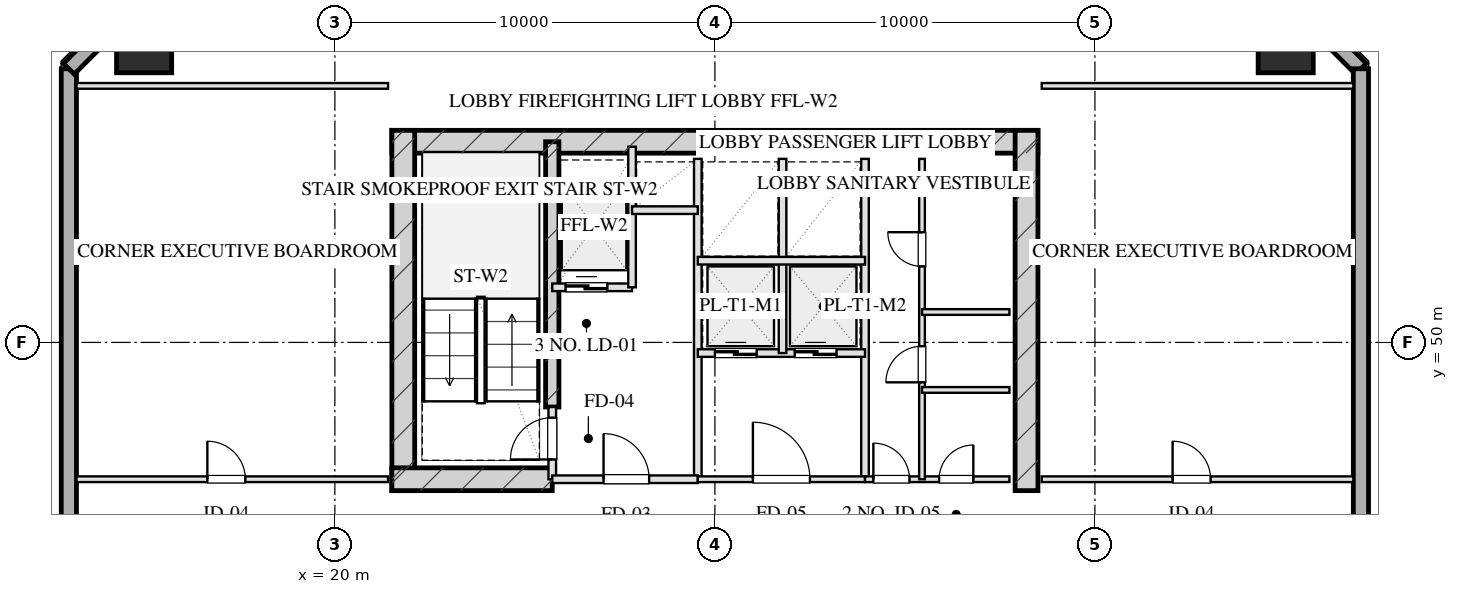
"""IFC4 building model, lengths in metres.
Left out: names, types, materials, properties, quantities, classifications, styles, units other than length and angle.
Written with IfcOpenShell. Run it as: python <this file> out.ifc"""

import sys

from ifc_helpers import new_model, si_unit, direction, frame, frame_2d, origin, origin_2d, place, context, subcontext, project, spatial, rectangle, hollow_rectangle, extrude, element, fill, save


model = new_model("IFC4")
c1 = context("Model", 3, precision=1e-05, world=origin(), true_north=direction((0.0, 1.0)))
c2 = subcontext(c1, "Body", "Model", "MODEL_VIEW")
j1 = project(units=[si_unit("LENGTHUNIT", "METRE"), si_unit("PLANEANGLEUNIT", "RADIAN")], contexts=[c1])
p1 = place(None, origin())
s1 = spatial("IfcSite", under=j1, at=p1, CompositionType="ELEMENT")
p2 = place(p1, origin())
s2 = spatial("IfcBuilding", under=s1, at=p2, CompositionType="ELEMENT")
p3 = place(p2, frame((0.0, 0.0, 166.75)))
s3 = spatial("IfcBuildingStorey", under=s2, at=p3, CompositionType="ELEMENT", Elevation=166.75)
p4 = place(p3, frame((21.5, 55.28, 0.0), z_axis=(0.0, 0.0, 1.0), x_axis=(1.0, 0.0, 0.0)))
e1 = element("IfcWall", 1, at=p4, inside=s3, PredefinedType="SHEAR", context=c2, shape_type="SweptSolid", body=[
    extrude(rectangle(XDim=17.0, YDim=0.6, at=frame_2d((8.5, 0.0))), origin(), (0.0, 0.0, 1.0), 3.45),
])
for number, where, z_axis, x_axis in (
    (2, (21.8, 46.1, 0.0), (0.0, 0.0, 1.0), (0.0, 1.0, 0.0)),
    (3, (38.2, 46.1, 0.0), (0.0, 0.0, 1.0), (0.0, 1.0, 0.0)),
):
    element("IfcWall", number, at=place(p3, frame(where, z_axis=z_axis, x_axis=x_axis)), inside=s3, PredefinedType="SHEAR", context=c2, shape_type="SweptSolid", body=[
        extrude(rectangle(XDim=9.48, YDim=0.6, at=frame_2d((4.74, 0.0))), origin(), (0.0, 0.0, 1.0), 3.45),
    ])
p5 = place(p3, frame((25.72, 48.3, 0.0), z_axis=(0.0, 0.0, 1.0), x_axis=(0.0, 1.0, 0.0)))
e4 = element("IfcWall", 4, at=p5, inside=s3, PredefinedType="SHEAR", context=c2, shape_type="SweptSolid", body=[
    extrude(rectangle(XDim=6.98, YDim=0.35, at=frame_2d((3.49, 0.0))), origin(), (0.0, 0.0, 1.0), 3.45),
])
p6 = place(p3, frame((21.5, 46.4, 0.0), z_axis=(0.0, 0.0, 1.0), x_axis=(1.0, 0.0, 0.0)))
e5 = element("IfcWall", 5, at=p6, inside=s3, PredefinedType="SHEAR", context=c2, shape_type="SweptSolid", body=[
    extrude(rectangle(XDim=4.22, YDim=0.6, at=frame_2d((2.11, 0.0))), origin(), (0.0, 0.0, 1.0), 3.45),
])
for number, where, z_axis, x_axis in (
    (6, (45.02, 57.82, 0.0), (0.0, 0.0, 1.0), (1.0, 0.0, 0.0)),
    (7, (14.98, 57.82, 0.0), (0.0, 0.0, 1.0), (1.0, 0.0, 0.0)),
):
    element("IfcColumn", number, at=place(p3, frame(where, z_axis=z_axis, x_axis=x_axis)), inside=s3, PredefinedType="COLUMN", context=c2, shape_type="SweptSolid", body=[
        extrude(hollow_rectangle(XDim=1.45, YDim=1.45, WallThickness=0.05, at=origin_2d()), origin(), (0.0, 0.0, 1.0), 3.451),
    ])
p7 = place(p3, frame((13.0, 10.8, 0.0), z_axis=(0.0, 0.0, 1.0), x_axis=(0.0, 1.0, 0.0)))
e8 = element("IfcWall", 8, at=p7, inside=s3, PredefinedType="SOLIDWALL", context=c2, shape_type="SweptSolid", body=[
    extrude(rectangle(XDim=46.4, YDim=0.4, at=frame_2d((23.2, 0.0))), origin(), (0.0, 0.0, 1.0), 2.61),
])
p8 = place(p7, frame((16.85, 0.0, 0.0)))
e9 = element("IfcOpeningElement", 9, at=p8, cuts=e8, PredefinedType="OPENING", context=c2, shape_type="SweptSolid", body=[
    extrude(rectangle(XDim=1.1, YDim=2.15, at=frame_2d((0.55, 1.075))), frame((0.0, 0.21, 0.0), z_axis=(0.0, -1.0, 0.0), x_axis=(1.0, 0.0, 0.0)), (0.0, 0.0, 1.0), 0.42),
])
for number, where, z_axis, x_axis in (
    (10, (13.0, 57.2, 0.0), (0.0, 0.0, 1.0), (0.707, 0.707, 0.0)),
    (11, (44.4, 59.8, 0.0), (0.0, 0.0, 1.0), (0.707, -0.707, 0.0)),
):
    element("IfcWall", number, at=place(p3, frame(where, z_axis=z_axis, x_axis=x_axis)), inside=s3, PredefinedType="SOLIDWALL", context=c2, shape_type="SweptSolid", body=[
        extrude(rectangle(XDim=3.677, YDim=0.4, at=frame_2d((1.838, 0.0))), origin(), (0.0, 0.0, 1.0), 2.61),
    ])
p9 = place(p3, frame((47.0, 57.2, 0.0), z_axis=(0.0, 0.0, 1.0), x_axis=(0.0, -1.0, 0.0)))
e12 = element("IfcWall", 12, at=p9, inside=s3, PredefinedType="SOLIDWALL", context=c2, shape_type="SweptSolid", body=[
    extrude(rectangle(XDim=46.4, YDim=0.4, at=frame_2d((23.2, 0.0))), origin(), (0.0, 0.0, 1.0), 2.61),
])
p10 = place(p9, frame((25.596, 0.0, 0.0)))
e13 = element("IfcOpeningElement", 13, at=p10, cuts=e12, PredefinedType="OPENING", context=c2, shape_type="SweptSolid", body=[
    extrude(rectangle(XDim=1.1, YDim=2.15, at=frame_2d((0.55, 1.075))), frame((0.0, 0.21, 0.0), z_axis=(0.0, -1.0, 0.0), x_axis=(1.0, 0.0, 0.0)), (0.0, 0.0, 1.0), 0.42),
])
p11 = place(p3, frame((25.72, 46.4, 0.0), z_axis=(0.0, 0.0, 1.0), x_axis=(0.0, 1.0, 0.0)))
e14 = element("IfcWall", 14, at=p11, inside=s3, PredefinedType="PARTITIONING", context=c2, shape_type="SweptSolid", body=[
    extrude(rectangle(XDim=1.9, YDim=0.2, at=frame_2d((0.95, 0.0))), origin(), (0.0, 0.0, 1.0), 3.175),
])
p12 = place(p11, frame((0.52, 0.0, 0.0)))
e15 = element("IfcOpeningElement", 15, at=p12, cuts=e14, PredefinedType="OPENING", context=c2, shape_type="SweptSolid", body=[
    extrude(rectangle(XDim=1.1, YDim=2.05, at=frame_2d((0.55, 1.025))), frame((0.0, 0.11, 0.0), z_axis=(0.0, -1.0, 0.0), x_axis=(1.0, 0.0, 0.0)), (0.0, 0.0, 1.0), 0.22),
])
p13 = place(p3, frame((29.55, 46.4, 0.0), z_axis=(0.0, 0.0, 1.0), x_axis=(0.0, 1.0, 0.0)))
e16 = element("IfcWall", 16, at=p13, inside=s3, PredefinedType="PARTITIONING", context=c2, shape_type="SweptSolid", body=[
    extrude(rectangle(XDim=8.43, YDim=0.2, at=frame_2d((4.215, 0.0))), origin(), (0.0, 0.0, 1.0), 3.175),
])
p14 = place(p3, frame((25.72, 46.4, 0.0), z_axis=(0.0, 0.0, 1.0), x_axis=(1.0, 0.0, 0.0)))
e17 = element("IfcWall", 17, at=p14, inside=s3, PredefinedType="PARTITIONING", context=c2, shape_type="SweptSolid", body=[
    extrude(rectangle(XDim=3.83, YDim=0.2, at=frame_2d((1.915, 0.0))), origin(), (0.0, 0.0, 1.0), 3.175),
])
p15 = place(p14, frame((1.35, 0.0, 0.0)))
e18 = element("IfcOpeningElement", 18, at=p15, cuts=e17, PredefinedType="OPENING", context=c2, shape_type="SweptSolid", body=[
    extrude(rectangle(XDim=1.2, YDim=2.05, at=frame_2d((0.6, 1.025))), frame((0.0, 0.11, 0.0), z_axis=(0.0, -1.0, 0.0), x_axis=(1.0, 0.0, 0.0)), (0.0, 0.0, 1.0), 0.22),
])
p16 = place(p3, frame((25.72, 51.45, 0.0), z_axis=(0.0, 0.0, 1.0), x_axis=(1.0, 0.0, 0.0)))
e19 = element("IfcWall", 19, at=p16, inside=s3, PredefinedType="PARTITIONING", context=c2, shape_type="SweptSolid", body=[
    extrude(rectangle(XDim=2.1, YDim=0.2, at=frame_2d((1.05, 0.0))), origin(), (0.0, 0.0, 1.0), 3.175),
])
p17 = place(p16, frame((0.35, 0.0, 0.0)))
e20 = element("IfcOpeningElement", 20, at=p17, cuts=e19, PredefinedType="OPENING", context=c2, shape_type="SweptSolid", body=[
    extrude(rectangle(XDim=1.1, YDim=2.05, at=frame_2d((0.55, 1.025))), frame((0.0, 0.11, 0.0), z_axis=(0.0, -1.0, 0.0), x_axis=(1.0, 0.0, 0.0)), (0.0, 0.0, 1.0), 0.22),
])
p18 = place(p3, frame((27.82, 51.45, 0.0), z_axis=(0.0, 0.0, 1.0), x_axis=(0.0, 1.0, 0.0)))
e21 = element("IfcWall", 21, at=p18, inside=s3, PredefinedType="PARTITIONING", context=c2, shape_type="SweptSolid", body=[
    extrude(rectangle(XDim=3.7, YDim=0.2, at=frame_2d((1.85, 0.0))), origin(), (0.0, 0.0, 1.0), 3.175),
])
p19 = place(p3, frame((27.82, 53.48, 0.0), z_axis=(0.0, 0.0, 1.0), x_axis=(1.0, 0.0, 0.0)))
e22 = element("IfcWall", 22, at=p19, inside=s3, PredefinedType="PARTITIONING", context=c2, shape_type="SweptSolid", body=[
    extrude(rectangle(XDim=1.73, YDim=0.2, at=frame_2d((0.865, 0.0))), origin(), (0.0, 0.0, 1.0), 3.175),
])
p20 = place(p3, frame((33.95, 46.4, 0.0), z_axis=(0.0, 0.0, 1.0), x_axis=(0.0, 1.0, 0.0)))
e23 = element("IfcWall", 23, at=p20, inside=s3, PredefinedType="PARTITIONING", context=c2, shape_type="SweptSolid", body=[
    extrude(rectangle(XDim=8.43, YDim=0.2, at=frame_2d((4.215, 0.0))), origin(), (0.0, 0.0, 1.0), 3.175),
])
p21 = place(p3, frame((29.55, 46.4, 0.0), z_axis=(0.0, 0.0, 1.0), x_axis=(1.0, 0.0, 0.0)))
e24 = element("IfcWall", 24, at=p21, inside=s3, PredefinedType="PARTITIONING", context=c2, shape_type="SweptSolid", body=[
    extrude(rectangle(XDim=4.4, YDim=0.15, at=frame_2d((2.2, 0.0))), origin(), (0.0, 0.0, 1.0), 3.175),
])
p22 = place(p21, frame((1.45, 0.0, 0.0)))
e25 = element("IfcOpeningElement", 25, at=p22, cuts=e24, PredefinedType="OPENING", context=c2, shape_type="SweptSolid", body=[
    extrude(rectangle(XDim=1.5, YDim=2.05, at=frame_2d((0.75, 1.025))), frame((0.0, 0.085, 0.0), z_axis=(0.0, -1.0, 0.0), x_axis=(1.0, 0.0, 0.0)), (0.0, 0.0, 1.0), 0.17),
])
p23 = place(p3, frame((29.55, 49.72, 0.0), z_axis=(0.0, 0.0, 1.0), x_axis=(1.0, 0.0, 0.0)))
e26 = element("IfcWall", 26, at=p23, inside=s3, PredefinedType="PARTITIONING", context=c2, shape_type="SweptSolid", body=[
    extrude(rectangle(XDim=4.4, YDim=0.2, at=frame_2d((2.2, 0.0))), origin(), (0.0, 0.0, 1.0), 3.175),
])
p24 = place(p23, frame((0.45, 0.0, 0.0)))
e27 = element("IfcOpeningElement", 27, at=p24, cuts=e26, PredefinedType="OPENING", context=c2, shape_type="SweptSolid", body=[
    extrude(rectangle(XDim=1.1, YDim=2.05, at=frame_2d((0.55, 1.025))), frame((0.0, 0.11, 0.0), z_axis=(0.0, -1.0, 0.0), x_axis=(1.0, 0.0, 0.0)), (0.0, 0.0, 1.0), 0.22),
])
p25 = place(p23, frame((2.55, 0.0, 0.0)))
e28 = element("IfcOpeningElement", 28, at=p25, cuts=e26, PredefinedType="OPENING", context=c2, shape_type="SweptSolid", body=[
    extrude(rectangle(XDim=1.1, YDim=2.05, at=frame_2d((0.55, 1.025))), frame((0.0, 0.11, 0.0), z_axis=(0.0, -1.0, 0.0), x_axis=(1.0, 0.0, 0.0)), (0.0, 0.0, 1.0), 0.22),
])
p26 = place(p3, frame((31.78, 49.72, 0.0), z_axis=(0.0, 0.0, 1.0), x_axis=(0.0, 1.0, 0.0)))
e29 = element("IfcWall", 29, at=p26, inside=s3, PredefinedType="PARTITIONING", context=c2, shape_type="SweptSolid", body=[
    extrude(rectangle(XDim=5.11, YDim=0.2, at=frame_2d((2.555, 0.0))), origin(), (0.0, 0.0, 1.0), 3.175),
])
p27 = place(p3, frame((29.55, 52.15, 0.0), z_axis=(0.0, 0.0, 1.0), x_axis=(1.0, 0.0, 0.0)))
e30 = element("IfcWall", 30, at=p27, inside=s3, PredefinedType="PARTITIONING", context=c2, shape_type="SweptSolid", body=[
    extrude(rectangle(XDim=4.4, YDim=0.2, at=frame_2d((2.2, 0.0))), origin(), (0.0, 0.0, 1.0), 3.175),
])
p28 = place(p3, frame((33.95, 46.4, 0.0), z_axis=(0.0, 0.0, 1.0), x_axis=(1.0, 0.0, 0.0)))
e31 = element("IfcWall", 31, at=p28, inside=s3, PredefinedType="PARTITIONING", context=c2, shape_type="SweptSolid", body=[
    extrude(rectangle(XDim=3.8, YDim=0.15, at=frame_2d((1.9, 0.0))), origin(), (0.0, 0.0, 1.0), 3.175),
])
p29 = place(p28, frame((0.22, 0.0, 0.0)))
e32 = element("IfcOpeningElement", 32, at=p29, cuts=e31, PredefinedType="OPENING", context=c2, shape_type="SweptSolid", body=[
    extrude(rectangle(XDim=0.95, YDim=2.05, at=frame_2d((0.475, 1.025))), frame((0.0, 0.085, 0.0), z_axis=(0.0, -1.0, 0.0), x_axis=(1.0, 0.0, 0.0)), (0.0, 0.0, 1.0), 0.17),
])
p30 = place(p28, frame((1.95, 0.0, 0.0)))
e33 = element("IfcOpeningElement", 33, at=p30, cuts=e31, PredefinedType="OPENING", context=c2, shape_type="SweptSolid", body=[
    extrude(rectangle(XDim=0.9, YDim=2.05, at=frame_2d((0.45, 1.025))), frame((0.0, 0.085, 0.0), z_axis=(0.0, -1.0, 0.0), x_axis=(1.0, 0.0, 0.0)), (0.0, 0.0, 1.0), 0.17),
])
p31 = place(p3, frame((35.45, 46.4, 0.0), z_axis=(0.0, 0.0, 1.0), x_axis=(0.0, 1.0, 0.0)))
e34 = element("IfcWall", 34, at=p31, inside=s3, PredefinedType="PARTITIONING", context=c2, shape_type="SweptSolid", body=[
    extrude(rectangle(XDim=8.43, YDim=0.15, at=frame_2d((4.215, 0.0))), origin(), (0.0, 0.0, 1.0), 2.765),
])
p32 = place(p31, frame((2.55, 0.0, 0.0)))
e35 = element("IfcOpeningElement", 35, at=p32, cuts=e34, PredefinedType="OPENING", context=c2, shape_type="SweptSolid", body=[
    extrude(rectangle(XDim=0.95, YDim=2.05, at=frame_2d((0.475, 1.025))), frame((0.0, 0.085, 0.0), z_axis=(0.0, -1.0, 0.0), x_axis=(1.0, 0.0, 0.0)), (0.0, 0.0, 1.0), 0.17),
])
p33 = place(p31, frame((5.6, 0.0, 0.0)))
e36 = element("IfcOpeningElement", 36, at=p33, cuts=e34, PredefinedType="OPENING", context=c2, shape_type="SweptSolid", body=[
    extrude(rectangle(XDim=0.9, YDim=2.05, at=frame_2d((0.45, 1.025))), frame((0.0, 0.085, 0.0), z_axis=(0.0, -1.0, 0.0), x_axis=(1.0, 0.0, 0.0)), (0.0, 0.0, 1.0), 0.17),
])
for number, where, z_axis, x_axis in (
    (37, (35.45, 50.8, 0.0), (0.0, 0.0, 1.0), (1.0, 0.0, 0.0)),
    (38, (35.45, 48.75, 0.0), (0.0, 0.0, 1.0), (1.0, 0.0, 0.0)),
):
    element("IfcWall", number, at=place(p3, frame(where, z_axis=z_axis, x_axis=x_axis)), inside=s3, PredefinedType="PARTITIONING", context=c2, shape_type="SweptSolid", body=[
        extrude(rectangle(XDim=2.3, YDim=0.15, at=frame_2d((1.15, 0.0))), origin(), (0.0, 0.0, 1.0), 3.175),
    ])
p34 = place(p3, frame((13.2, 56.75, 0.0), z_axis=(0.0, 0.0, 1.0), x_axis=(1.0, 0.0, 0.0)))
e39 = element("IfcWall", 39, at=p34, inside=s3, PredefinedType="PARTITIONING", context=c2, shape_type="SweptSolid", body=[
    extrude(rectangle(XDim=8.2, YDim=0.15, at=frame_2d((4.1, 0.0))), origin(), (0.0, 0.0, 1.0), 3.175),
])
p35 = place(p3, frame((13.2, 46.4, 0.0), z_axis=(0.0, 0.0, 1.0), x_axis=(1.0, 0.0, 0.0)))
e40 = element("IfcWall", 40, at=p35, inside=s3, PredefinedType="PARTITIONING", context=c2, shape_type="SweptSolid", body=[
    extrude(rectangle(XDim=8.2, YDim=0.15, at=frame_2d((4.1, 0.0))), origin(), (0.0, 0.0, 1.0), 3.175),
])
p36 = place(p35, frame((3.444, 0.0, 0.0)))
e41 = element("IfcOpeningElement", 41, at=p36, cuts=e40, PredefinedType="OPENING", context=c2, shape_type="SweptSolid", body=[
    extrude(rectangle(XDim=1.0, YDim=2.05, at=frame_2d((0.5, 1.025))), frame((0.0, 0.085, 0.0), z_axis=(0.0, -1.0, 0.0), x_axis=(1.0, 0.0, 0.0)), (0.0, 0.0, 1.0), 0.17),
])
p37 = place(p3, frame((38.6, 56.75, 0.0), z_axis=(0.0, 0.0, 1.0), x_axis=(1.0, 0.0, 0.0)))
e42 = element("IfcWall", 42, at=p37, inside=s3, PredefinedType="PARTITIONING", context=c2, shape_type="SweptSolid", body=[
    extrude(rectangle(XDim=8.2, YDim=0.15, at=frame_2d((4.1, 0.0))), origin(), (0.0, 0.0, 1.0), 3.175),
])
p38 = place(p3, frame((38.6, 46.4, 0.0), z_axis=(0.0, 0.0, 1.0), x_axis=(1.0, 0.0, 0.0)))
e43 = element("IfcWall", 43, at=p38, inside=s3, PredefinedType="PARTITIONING", context=c2, shape_type="SweptSolid", body=[
    extrude(rectangle(XDim=8.2, YDim=0.15, at=frame_2d((4.1, 0.0))), origin(), (0.0, 0.0, 1.0), 3.175),
])
p39 = place(p38, frame((3.444, 0.0, 0.0)))
e44 = element("IfcOpeningElement", 44, at=p39, cuts=e43, PredefinedType="OPENING", context=c2, shape_type="SweptSolid", body=[
    extrude(rectangle(XDim=1.0, YDim=2.05, at=frame_2d((0.5, 1.025))), frame((0.0, 0.085, 0.0), z_axis=(0.0, -1.0, 0.0), x_axis=(1.0, 0.0, 0.0)), (0.0, 0.0, 1.0), 0.17),
])
p40 = place(p12, origin())
e45 = element("IfcDoor", 45, at=p40, inside=s3, OperationType="SINGLE_SWING_LEFT", PredefinedType="DOOR", context=c2, shape_type="SweptSolid", body=[
    extrude(rectangle(XDim=1.1, YDim=2.05, at=frame_2d((0.55, 1.025))), frame((0.0, 0.025, 0.0), z_axis=(0.0, -1.0, 0.0), x_axis=(1.0, 0.0, 0.0)), (0.0, 0.0, 1.0), 0.05),
])
fill(e15, e45)
p41 = place(p15, origin())
e46 = element("IfcDoor", 46, at=p41, inside=s3, OperationType="SINGLE_SWING_LEFT", PredefinedType="DOOR", context=c2, shape_type="SweptSolid", body=[
    extrude(rectangle(XDim=1.2, YDim=2.05, at=frame_2d((0.6, 1.025))), frame((0.0, 0.025, 0.0), z_axis=(0.0, -1.0, 0.0), x_axis=(1.0, 0.0, 0.0)), (0.0, 0.0, 1.0), 0.05),
])
fill(e18, e46)
p42 = place(p17, origin())
e47 = element("IfcDoor", 47, at=p42, inside=s3, OperationType="DOUBLE_DOOR_SLIDING", PredefinedType="DOOR", context=c2, shape_type="SweptSolid", body=[
    extrude(rectangle(XDim=1.1, YDim=2.05, at=frame_2d((0.55, 1.025))), frame((0.0, 0.025, 0.0), z_axis=(0.0, -1.0, 0.0), x_axis=(1.0, 0.0, 0.0)), (0.0, 0.0, 1.0), 0.05),
])
fill(e20, e47)
p43 = place(p22, origin())
e48 = element("IfcDoor", 48, at=p43, inside=s3, OperationType="SINGLE_SWING_LEFT", PredefinedType="DOOR", context=c2, shape_type="SweptSolid", body=[
    extrude(rectangle(XDim=1.5, YDim=2.05, at=frame_2d((0.75, 1.025))), frame((0.0, 0.025, 0.0), z_axis=(0.0, -1.0, 0.0), x_axis=(1.0, 0.0, 0.0)), (0.0, 0.0, 1.0), 0.05),
])
fill(e25, e48)
p44 = place(p24, origin())
e49 = element("IfcDoor", 49, at=p44, inside=s3, OperationType="DOUBLE_DOOR_SLIDING", PredefinedType="DOOR", context=c2, shape_type="SweptSolid", body=[
    extrude(rectangle(XDim=1.1, YDim=2.05, at=frame_2d((0.55, 1.025))), frame((0.0, 0.025, 0.0), z_axis=(0.0, -1.0, 0.0), x_axis=(1.0, 0.0, 0.0)), (0.0, 0.0, 1.0), 0.05),
])
fill(e27, e49)
p45 = place(p25, origin())
e50 = element("IfcDoor", 50, at=p45, inside=s3, OperationType="DOUBLE_DOOR_SLIDING", PredefinedType="DOOR", context=c2, shape_type="SweptSolid", body=[
    extrude(rectangle(XDim=1.1, YDim=2.05, at=frame_2d((0.55, 1.025))), frame((0.0, 0.025, 0.0), z_axis=(0.0, -1.0, 0.0), x_axis=(1.0, 0.0, 0.0)), (0.0, 0.0, 1.0), 0.05),
])
fill(e28, e50)
p46 = place(p29, origin())
e51 = element("IfcDoor", 51, at=p46, inside=s3, OperationType="SINGLE_SWING_LEFT", PredefinedType="DOOR", context=c2, shape_type="SweptSolid", body=[
    extrude(rectangle(XDim=0.95, YDim=2.05, at=frame_2d((0.475, 1.025))), frame((0.0, 0.025, 0.0), z_axis=(0.0, -1.0, 0.0), x_axis=(1.0, 0.0, 0.0)), (0.0, 0.0, 1.0), 0.05),
])
fill(e32, e51)
p47 = place(p30, origin())
e52 = element("IfcDoor", 52, at=p47, inside=s3, OperationType="SINGLE_SWING_RIGHT", PredefinedType="DOOR", context=c2, shape_type="SweptSolid", body=[
    extrude(rectangle(XDim=0.9, YDim=2.05, at=frame_2d((0.45, 1.025))), frame((0.0, 0.025, 0.0), z_axis=(0.0, -1.0, 0.0), x_axis=(1.0, 0.0, 0.0)), (0.0, 0.0, 1.0), 0.05),
])
fill(e33, e52)
p48 = place(p32, origin())
e53 = element("IfcDoor", 53, at=p48, inside=s3, OperationType="SINGLE_SWING_LEFT", PredefinedType="DOOR", context=c2, shape_type="SweptSolid", body=[
    extrude(rectangle(XDim=0.95, YDim=2.05, at=frame_2d((0.475, 1.025))), frame((0.0, 0.025, 0.0), z_axis=(0.0, -1.0, 0.0), x_axis=(1.0, 0.0, 0.0)), (0.0, 0.0, 1.0), 0.05),
])
fill(e35, e53)
p49 = place(p33, origin())
e54 = element("IfcDoor", 54, at=p49, inside=s3, OperationType="SINGLE_SWING_RIGHT", PredefinedType="DOOR", context=c2, shape_type="SweptSolid", body=[
    extrude(rectangle(XDim=0.9, YDim=2.05, at=frame_2d((0.45, 1.025))), frame((0.0, 0.025, 0.0), z_axis=(0.0, -1.0, 0.0), x_axis=(1.0, 0.0, 0.0)), (0.0, 0.0, 1.0), 0.05),
])
fill(e36, e54)
p50 = place(p36, origin())
e55 = element("IfcDoor", 55, at=p50, inside=s3, OperationType="SINGLE_SWING_LEFT", PredefinedType="DOOR", context=c2, shape_type="SweptSolid", body=[
    extrude(rectangle(XDim=1.0, YDim=2.05, at=frame_2d((0.5, 1.025))), frame((0.0, 0.025, 0.0), z_axis=(0.0, -1.0, 0.0), x_axis=(1.0, 0.0, 0.0)), (0.0, 0.0, 1.0), 0.05),
])
fill(e41, e55)
p51 = place(p39, origin())
e56 = element("IfcDoor", 56, at=p51, inside=s3, OperationType="SINGLE_SWING_LEFT", PredefinedType="DOOR", context=c2, shape_type="SweptSolid", body=[
    extrude(rectangle(XDim=1.0, YDim=2.05, at=frame_2d((0.5, 1.025))), frame((0.0, 0.025, 0.0), z_axis=(0.0, -1.0, 0.0), x_axis=(1.0, 0.0, 0.0)), (0.0, 0.0, 1.0), 0.05),
])
fill(e44, e56)
save(model, sys.argv[1])
